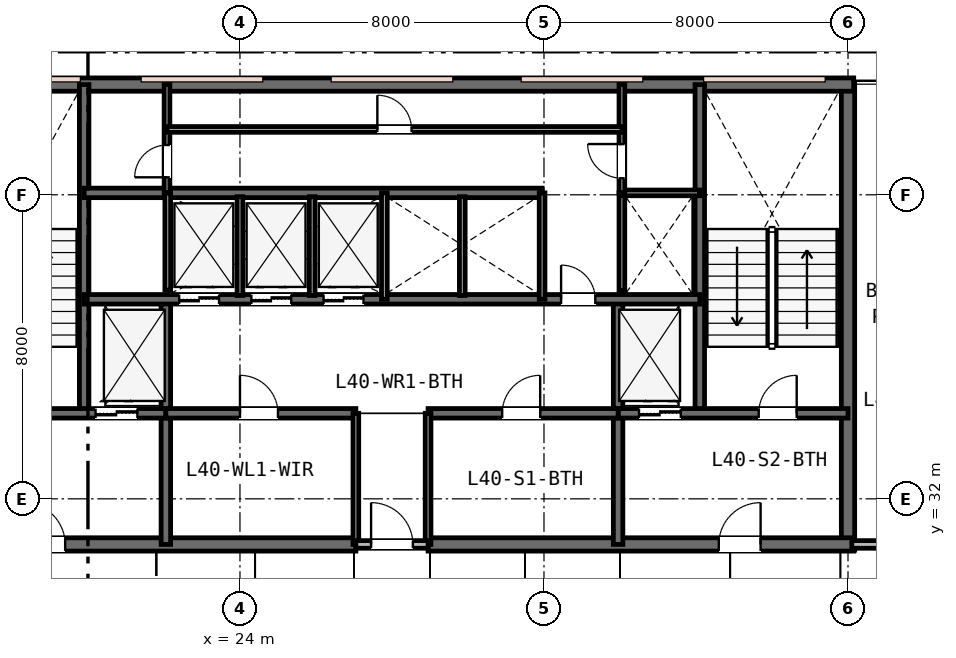
"""IFC4 building model, lengths in metres.
Left out: names, types, materials, properties, quantities, classifications, styles, units other than length and angle.
Written with IfcOpenShell. Run it as: python <this file> out.ifc"""

import sys

from ifc_helpers import new_model, si_unit, direction, frame, frame_2d, origin, place, context, subcontext, project, spatial, rectangle, extrude, element, fill, save


model = new_model("IFC4")
c1 = context("Model", 3, precision=1e-05, world=origin(), true_north=direction((0.0, 1.0)))
c2 = subcontext(c1, "Body", "Model", "MODEL_VIEW")
j1 = project(units=[si_unit("LENGTHUNIT", "METRE"), si_unit("PLANEANGLEUNIT", "RADIAN")], contexts=[c1])
p1 = place(None, origin())
s1 = spatial("IfcSite", under=j1, at=p1, CompositionType="ELEMENT")
p2 = place(p1, origin())
s2 = spatial("IfcBuilding", under=s1, at=p2, CompositionType="ELEMENT")
p3 = place(p2, frame((0.0, 0.0, 157.8)))
s3 = spatial("IfcBuildingStorey", under=s2, at=p3, CompositionType="ELEMENT", Elevation=157.8)
p4 = place(p3, frame((40.0, 30.65, 0.0), z_axis=(0.0, 0.0, 1.0), x_axis=(0.0, 1.0, 0.0)))
e1 = element("IfcWall", 1, at=p4, inside=s3, PredefinedType="SHEAR", context=c2, shape_type="SweptSolid", body=[
    extrude(rectangle(XDim=12.3, YDim=0.35, at=frame_2d((6.15, 0.0))), origin(), (0.0, 0.0, 1.0), 3.6),
])
p5 = place(p3, frame((15.85, 42.9, 0.0), z_axis=(0.0, 0.0, 1.0), x_axis=(1.0, 0.0, 0.0)))
e2 = element("IfcWall", 2, at=p5, inside=s3, PredefinedType="SHEAR", context=c2, shape_type="SweptSolid", body=[
    extrude(rectangle(XDim=24.3, YDim=0.35, at=frame_2d((12.15, 0.0))), origin(), (0.0, 0.0, 1.0), 3.6),
])
p6 = place(p3, frame((15.85, 30.8, 0.0), z_axis=(0.0, 0.0, 1.0), x_axis=(1.0, 0.0, 0.0)))
e3 = element("IfcWall", 3, at=p6, inside=s3, PredefinedType="SHEAR", context=c2, shape_type="SweptSolid", body=[
    extrude(rectangle(XDim=11.2, YDim=0.35, at=frame_2d((5.6, 0.0))), origin(), (0.0, 0.0, 1.0), 3.6),
])
p7 = place(p6, frame((2.45, 0.0, 0.0)))
e4 = element("IfcOpeningElement", 4, at=p7, cuts=e3, PredefinedType="OPENING", context=c2, shape_type="SweptSolid", body=[
    extrude(rectangle(XDim=1.1, YDim=2.15, at=frame_2d((0.55, 1.075))), frame((0.0, 0.185, 0.0), z_axis=(0.0, -1.0, 0.0), x_axis=(1.0, 0.0, 0.0)), (0.0, 0.0, 1.0), 0.37),
])
p8 = place(p3, frame((28.95, 30.8, 0.0), z_axis=(0.0, 0.0, 1.0), x_axis=(1.0, 0.0, 0.0)))
e5 = element("IfcWall", 5, at=p8, inside=s3, PredefinedType="SHEAR", context=c2, shape_type="SweptSolid", body=[
    extrude(rectangle(XDim=11.2, YDim=0.35, at=frame_2d((5.6, 0.0))), origin(), (0.0, 0.0, 1.0), 3.6),
])
p9 = place(p8, frame((7.65, 0.0, 0.0)))
e6 = element("IfcOpeningElement", 6, at=p9, cuts=e5, PredefinedType="OPENING", context=c2, shape_type="SweptSolid", body=[
    extrude(rectangle(XDim=1.1, YDim=2.15, at=frame_2d((0.55, 1.075))), frame((0.0, 0.185, 0.0), z_axis=(0.0, -1.0, 0.0), x_axis=(1.0, 0.0, 0.0)), (0.0, 0.0, 1.0), 0.37),
])
for number, where, z_axis, x_axis in (
    (7, (19.9, 34.25, 0.0), (0.0, 0.0, 1.0), (0.0, 1.0, 0.0)),
    (8, (36.1, 34.25, 0.0), (0.0, 0.0, 1.0), (0.0, 1.0, 0.0)),
):
    element("IfcWall", number, at=place(p3, frame(where, z_axis=z_axis, x_axis=x_axis)), inside=s3, PredefinedType="SHEAR", context=c2, shape_type="SweptSolid", body=[
        extrude(rectangle(XDim=8.65, YDim=0.25, at=frame_2d((4.325, 0.0))), origin(), (0.0, 0.0, 1.0), 3.6),
    ])
for number, where, z_axis, x_axis in (
    (9, (22.05, 30.8, 0.0), (0.0, 0.0, 1.0), (0.0, 1.0, 0.0)),
    (10, (33.95, 30.8, 0.0), (0.0, 0.0, 1.0), (0.0, 1.0, 0.0)),
):
    element("IfcWall", number, at=place(p3, frame(where, z_axis=z_axis, x_axis=x_axis)), inside=s3, PredefinedType="SHEAR", context=c2, shape_type="SweptSolid", body=[
        extrude(rectangle(XDim=6.45, YDim=0.25, at=frame_2d((3.225, 0.0))), origin(), (0.0, 0.0, 1.0), 3.6),
    ])
p10 = place(p3, frame((16.0, 34.25, 0.0), z_axis=(0.0, 0.0, 1.0), x_axis=(1.0, 0.0, 0.0)))
e11 = element("IfcWall", 11, at=p10, inside=s3, PredefinedType="SHEAR", context=c2, shape_type="SweptSolid", body=[
    extrude(rectangle(XDim=6.05, YDim=0.25, at=frame_2d((3.025, 0.0))), origin(), (0.0, 0.0, 1.0), 3.6),
])
p11 = place(p10, frame((1.25, 0.0, 0.0)))
e12 = element("IfcOpeningElement", 12, at=p11, cuts=e11, PredefinedType="OPENING", context=c2, shape_type="SweptSolid", body=[
    extrude(rectangle(XDim=1.0, YDim=2.15, at=frame_2d((0.5, 1.075))), frame((0.0, 0.135, 0.0), z_axis=(0.0, -1.0, 0.0), x_axis=(1.0, 0.0, 0.0)), (0.0, 0.0, 1.0), 0.27),
])
p12 = place(p10, frame((4.2, 0.0, 0.0)))
e13 = element("IfcOpeningElement", 13, at=p12, cuts=e11, PredefinedType="OPENING", context=c2, shape_type="SweptSolid", body=[
    extrude(rectangle(XDim=1.1, YDim=2.15, at=frame_2d((0.55, 1.075))), frame((0.0, 0.135, 0.0), z_axis=(0.0, -1.0, 0.0), x_axis=(1.0, 0.0, 0.0)), (0.0, 0.0, 1.0), 0.27),
])
p13 = place(p3, frame((33.95, 34.25, 0.0), z_axis=(0.0, 0.0, 1.0), x_axis=(1.0, 0.0, 0.0)))
e14 = element("IfcWall", 14, at=p13, inside=s3, PredefinedType="SHEAR", context=c2, shape_type="SweptSolid", body=[
    extrude(rectangle(XDim=6.05, YDim=0.25, at=frame_2d((3.025, 0.0))), origin(), (0.0, 0.0, 1.0), 3.6),
])
p14 = place(p13, frame((3.7, 0.0, 0.0)))
e15 = element("IfcOpeningElement", 15, at=p14, cuts=e14, PredefinedType="OPENING", context=c2, shape_type="SweptSolid", body=[
    extrude(rectangle(XDim=1.0, YDim=2.15, at=frame_2d((0.5, 1.075))), frame((0.0, 0.135, 0.0), z_axis=(0.0, -1.0, 0.0), x_axis=(1.0, 0.0, 0.0)), (0.0, 0.0, 1.0), 0.27),
])
p15 = place(p13, frame((0.55, 0.0, 0.0)))
e16 = element("IfcOpeningElement", 16, at=p15, cuts=e14, PredefinedType="OPENING", context=c2, shape_type="SweptSolid", body=[
    extrude(rectangle(XDim=1.1, YDim=2.15, at=frame_2d((0.55, 1.075))), frame((0.0, 0.135, 0.0), z_axis=(0.0, -1.0, 0.0), x_axis=(1.0, 0.0, 0.0)), (0.0, 0.0, 1.0), 0.27),
])
p16 = place(p3, frame((22.05, 34.25, 0.0), z_axis=(0.0, 0.0, 1.0), x_axis=(1.0, 0.0, 0.0)))
e17 = element("IfcWall", 17, at=p16, inside=s3, PredefinedType="SHEAR", context=c2, shape_type="SweptSolid", body=[
    extrude(rectangle(XDim=5.0, YDim=0.25, at=frame_2d((2.5, 0.0))), origin(), (0.0, 0.0, 1.0), 3.6),
])
p17 = place(p16, frame((1.95, 0.0, 0.0)))
e18 = element("IfcOpeningElement", 18, at=p17, cuts=e17, PredefinedType="OPENING", context=c2, shape_type="SweptSolid", body=[
    extrude(rectangle(XDim=1.0, YDim=2.15, at=frame_2d((0.5, 1.075))), frame((0.0, 0.135, 0.0), z_axis=(0.0, -1.0, 0.0), x_axis=(1.0, 0.0, 0.0)), (0.0, 0.0, 1.0), 0.27),
])
p18 = place(p3, frame((28.95, 34.25, 0.0), z_axis=(0.0, 0.0, 1.0), x_axis=(1.0, 0.0, 0.0)))
e19 = element("IfcWall", 19, at=p18, inside=s3, PredefinedType="SHEAR", context=c2, shape_type="SweptSolid", body=[
    extrude(rectangle(XDim=5.0, YDim=0.25, at=frame_2d((2.5, 0.0))), origin(), (0.0, 0.0, 1.0), 3.6),
])
p19 = place(p18, frame((1.95, 0.0, 0.0)))
e20 = element("IfcOpeningElement", 20, at=p19, cuts=e19, PredefinedType="OPENING", context=c2, shape_type="SweptSolid", body=[
    extrude(rectangle(XDim=1.0, YDim=2.15, at=frame_2d((0.5, 1.075))), frame((0.0, 0.135, 0.0), z_axis=(0.0, -1.0, 0.0), x_axis=(1.0, 0.0, 0.0)), (0.0, 0.0, 1.0), 0.27),
])
p20 = place(p3, frame((19.9, 37.25, 0.0), z_axis=(0.0, 0.0, 1.0), x_axis=(1.0, 0.0, 0.0)))
e21 = element("IfcWall", 21, at=p20, inside=s3, PredefinedType="SHEAR", context=c2, shape_type="SweptSolid", body=[
    extrude(rectangle(XDim=16.2, YDim=0.25, at=frame_2d((8.1, 0.0))), origin(), (0.0, 0.0, 1.0), 3.6),
])
p21 = place(p20, frame((12.55, 0.0, 0.0)))
e22 = element("IfcOpeningElement", 22, at=p21, cuts=e21, PredefinedType="OPENING", context=c2, shape_type="SweptSolid", body=[
    extrude(rectangle(XDim=0.9, YDim=2.15, at=frame_2d((0.45, 1.075))), frame((0.0, 0.135, 0.0), z_axis=(0.0, -1.0, 0.0), x_axis=(1.0, 0.0, 0.0)), (0.0, 0.0, 1.0), 0.27),
])
p22 = place(p20, frame((2.5, 0.0, 0.0)))
e23 = element("IfcOpeningElement", 23, at=p22, cuts=e21, PredefinedType="OPENING", context=c2, shape_type="SweptSolid", body=[
    extrude(rectangle(XDim=1.05, YDim=2.15, at=frame_2d((0.525, 1.075))), frame((0.0, 0.135, 0.0), z_axis=(0.0, -1.0, 0.0), x_axis=(1.0, 0.0, 0.0)), (0.0, 0.0, 1.0), 0.27),
])
p23 = place(p20, frame((4.4, 0.0, 0.0)))
e24 = element("IfcOpeningElement", 24, at=p23, cuts=e21, PredefinedType="OPENING", context=c2, shape_type="SweptSolid", body=[
    extrude(rectangle(XDim=1.05, YDim=2.15, at=frame_2d((0.525, 1.075))), frame((0.0, 0.135, 0.0), z_axis=(0.0, -1.0, 0.0), x_axis=(1.0, 0.0, 0.0)), (0.0, 0.0, 1.0), 0.27),
])
p24 = place(p20, frame((6.3, 0.0, 0.0)))
e25 = element("IfcOpeningElement", 25, at=p24, cuts=e21, PredefinedType="OPENING", context=c2, shape_type="SweptSolid", body=[
    extrude(rectangle(XDim=1.05, YDim=2.15, at=frame_2d((0.525, 1.075))), frame((0.0, 0.135, 0.0), z_axis=(0.0, -1.0, 0.0), x_axis=(1.0, 0.0, 0.0)), (0.0, 0.0, 1.0), 0.27),
])
p25 = place(p3, frame((19.9, 40.05, 0.0), z_axis=(0.0, 0.0, 1.0), x_axis=(1.0, 0.0, 0.0)))
e26 = element("IfcWall", 26, at=p25, inside=s3, PredefinedType="SHEAR", context=c2, shape_type="SweptSolid", body=[
    extrude(rectangle(XDim=12.05, YDim=0.25, at=frame_2d((6.025, 0.0))), origin(), (0.0, 0.0, 1.0), 3.6),
])
for number, where, z_axis, x_axis in (
    (27, (27.05, 30.8, 0.0), (0.0, 0.0, 1.0), (0.0, 1.0, 0.0)),
    (28, (28.95, 30.8, 0.0), (0.0, 0.0, 1.0), (0.0, 1.0, 0.0)),
):
    element("IfcWall", number, at=place(p3, frame(where, z_axis=z_axis, x_axis=x_axis)), inside=s3, PredefinedType="PLUMBINGWALL", context=c2, shape_type="SweptSolid", body=[
        extrude(rectangle(XDim=3.45, YDim=0.15, at=frame_2d((1.725, 0.0))), origin(), (0.0, 0.0, 1.0), 2.96),
    ])
p26 = place(p3, frame((27.05, 30.8, 0.0), z_axis=(0.0, 0.0, 1.0), x_axis=(1.0, 0.0, 0.0)))
e29 = element("IfcWall", 29, at=p26, inside=s3, PredefinedType="PARTITIONING", context=c2, shape_type="SweptSolid", body=[
    extrude(rectangle(XDim=1.9, YDim=0.2, at=frame_2d((0.95, 0.0))), origin(), (0.0, 0.0, 1.0), 2.96),
])
p27 = place(p26, frame((0.4, 0.0, 0.0)))
e30 = element("IfcOpeningElement", 30, at=p27, cuts=e29, PredefinedType="OPENING", context=c2, shape_type="SweptSolid", body=[
    extrude(rectangle(XDim=1.1, YDim=2.15, at=frame_2d((0.55, 1.075))), frame((0.0, 0.11, 0.0), z_axis=(0.0, -1.0, 0.0), x_axis=(1.0, 0.0, 0.0)), (0.0, 0.0, 1.0), 0.22),
])
p28 = place(p3, frame((22.1, 37.49, 0.0), z_axis=(0.0, 0.0, 1.0), x_axis=(0.0, 1.0, 0.0)))
e31 = element("IfcWall", 31, at=p28, inside=s3, PredefinedType="PLUMBINGWALL", context=c2, shape_type="SweptSolid", body=[
    extrude(rectangle(XDim=2.56, YDim=0.15, at=frame_2d((1.28, 0.0))), origin(), (0.0, 0.0, 1.0), 3.33),
])
p29 = place(p3, frame((27.8, 37.25, 0.0), z_axis=(0.0, 0.0, 1.0), x_axis=(0.0, 1.0, 0.0)))
e32 = element("IfcWall", 32, at=p29, inside=s3, PredefinedType="PLUMBINGWALL", context=c2, shape_type="SweptSolid", body=[
    extrude(rectangle(XDim=2.8, YDim=0.15, at=frame_2d((1.4, 0.0))), origin(), (0.0, 0.0, 1.0), 3.33),
])
for number, where, z_axis, x_axis in (
    (33, (24.0, 37.35, 0.0), (0.0, 0.0, 1.0), (0.0, 1.0, 0.0)),
    (34, (25.9, 37.35, 0.0), (0.0, 0.0, 1.0), (0.0, 1.0, 0.0)),
):
    element("IfcWall", number, at=place(p3, frame(where, z_axis=z_axis, x_axis=x_axis)), inside=s3, PredefinedType="PLUMBINGWALL", context=c2, shape_type="SweptSolid", body=[
        extrude(rectangle(XDim=2.6, YDim=0.15, at=frame_2d((1.3, 0.0))), origin(), (0.0, 0.0, 1.0), 3.33),
    ])
p30 = place(p3, frame((31.95, 37.25, 0.0), z_axis=(0.0, 0.0, 1.0), x_axis=(0.0, 1.0, 0.0)))
e35 = element("IfcWall", 35, at=p30, inside=s3, PredefinedType="PLUMBINGWALL", context=c2, shape_type="SweptSolid", body=[
    extrude(rectangle(XDim=2.8, YDim=0.15, at=frame_2d((1.4, 0.0))), origin(), (0.0, 0.0, 1.0), 3.33),
])
p31 = place(p3, frame((29.85, 37.35, 0.0), z_axis=(0.0, 0.0, 1.0), x_axis=(0.0, 1.0, 0.0)))
e36 = element("IfcWall", 36, at=p31, inside=s3, PredefinedType="PLUMBINGWALL", context=c2, shape_type="SweptSolid", body=[
    extrude(rectangle(XDim=2.6, YDim=0.15, at=frame_2d((1.3, 0.0))), origin(), (0.0, 0.0, 1.0), 3.33),
])
p32 = place(p3, frame((34.05, 37.473, 0.0), z_axis=(0.0, 0.0, 1.0), x_axis=(0.0, 1.0, 0.0)))
e37 = element("IfcWall", 37, at=p32, inside=s3, PredefinedType="PLUMBINGWALL", context=c2, shape_type="SweptSolid", body=[
    extrude(rectangle(XDim=2.577, YDim=0.15, at=frame_2d((1.288, 0.0))), origin(), (0.0, 0.0, 1.0), 3.33),
])
p33 = place(p3, frame((34.05, 40.05, 0.0), z_axis=(0.0, 0.0, 1.0), x_axis=(1.0, 0.0, 0.0)))
e38 = element("IfcWall", 38, at=p33, inside=s3, PredefinedType="PARTITIONING", context=c2, shape_type="SweptSolid", body=[
    extrude(rectangle(XDim=2.05, YDim=0.15, at=frame_2d((1.025, 0.0))), origin(), (0.0, 0.0, 1.0), 3.33),
])
p34 = place(p3, frame((34.05, 40.05, 0.0), z_axis=(0.0, 0.0, 1.0), x_axis=(0.0, 1.0, 0.0)))
e39 = element("IfcWall", 39, at=p34, inside=s3, PredefinedType="PARTITIONING", context=c2, shape_type="SweptSolid", body=[
    extrude(rectangle(XDim=2.85, YDim=0.15, at=frame_2d((1.425, 0.0))), origin(), (0.0, 0.0, 1.0), 3.33),
])
p35 = place(p34, frame((0.385, 0.0, 0.0)))
e40 = element("IfcOpeningElement", 40, at=p35, cuts=e39, PredefinedType="OPENING", context=c2, shape_type="SweptSolid", body=[
    extrude(rectangle(XDim=0.9, YDim=2.15, at=frame_2d((0.45, 1.075))), frame((0.0, 0.085, 0.0), z_axis=(0.0, -1.0, 0.0), x_axis=(1.0, 0.0, 0.0)), (0.0, 0.0, 1.0), 0.17),
])
p36 = place(p3, frame((22.08, 40.05, 0.0), z_axis=(0.0, 0.0, 1.0), x_axis=(0.0, 1.0, 0.0)))
e41 = element("IfcWall", 41, at=p36, inside=s3, PredefinedType="PARTITIONING", context=c2, shape_type="SweptSolid", body=[
    extrude(rectangle(XDim=2.85, YDim=0.15, at=frame_2d((1.425, 0.0))), origin(), (0.0, 0.0, 1.0), 3.33),
])
p37 = place(p36, frame((0.41, 0.0, 0.0)))
e42 = element("IfcOpeningElement", 42, at=p37, cuts=e41, PredefinedType="OPENING", context=c2, shape_type="SweptSolid", body=[
    extrude(rectangle(XDim=0.85, YDim=2.15, at=frame_2d((0.425, 1.075))), frame((0.0, 0.085, 0.0), z_axis=(0.0, -1.0, 0.0), x_axis=(1.0, 0.0, 0.0)), (0.0, 0.0, 1.0), 0.17),
])
p38 = place(p3, frame((22.08, 41.72, 0.0), z_axis=(0.0, 0.0, 1.0), x_axis=(1.0, 0.0, 0.0)))
e43 = element("IfcWall", 43, at=p38, inside=s3, PredefinedType="PARTITIONING", context=c2, shape_type="SweptSolid", body=[
    extrude(rectangle(XDim=11.97, YDim=0.15, at=frame_2d((5.985, 0.0))), origin(), (0.0, 0.0, 1.0), 3.33),
])
p39 = place(p38, frame((5.535, 0.0, 0.0)))
e44 = element("IfcOpeningElement", 44, at=p39, cuts=e43, PredefinedType="OPENING", context=c2, shape_type="SweptSolid", body=[
    extrude(rectangle(XDim=0.9, YDim=2.15, at=frame_2d((0.45, 1.075))), frame((0.0, 0.085, 0.0), z_axis=(0.0, -1.0, 0.0), x_axis=(1.0, 0.0, 0.0)), (0.0, 0.0, 1.0), 0.17),
])
p40 = place(p3, frame((40.1, 30.8, 0.0), z_axis=(0.0, 0.0, 1.0), x_axis=(1.0, 0.0, 0.0)))
e45 = element("IfcWall", 45, at=p40, inside=s3, PredefinedType="PARTITIONING", context=c2, shape_type="SweptSolid", body=[
    extrude(rectangle(XDim=4.1, YDim=0.2, at=frame_2d((2.05, 0.0))), origin(), (0.0, 0.0, 1.0), 2.93),
])
p41 = place(p40, frame((1.575, 0.0, 0.0)))
e46 = element("IfcOpeningElement", 46, at=p41, cuts=e45, PredefinedType="OPENING", context=c2, shape_type="SweptSolid", body=[
    extrude(rectangle(XDim=0.95, YDim=2.15, at=frame_2d((0.475, 1.075))), frame((0.0, 0.11, 0.0), z_axis=(0.0, -1.0, 0.0), x_axis=(1.0, 0.0, 0.0)), (0.0, 0.0, 1.0), 0.22),
])
p42 = place(p27, origin())
e47 = element("IfcDoor", 47, at=p42, inside=s3, OperationType="SINGLE_SWING_LEFT", PredefinedType="DOOR", context=c2, shape_type="SweptSolid", body=[
    extrude(rectangle(XDim=1.1, YDim=2.15, at=frame_2d((0.55, 1.075))), frame((0.0, 0.025, 0.0), z_axis=(0.0, -1.0, 0.0), x_axis=(1.0, 0.0, 0.0)), (0.0, 0.0, 1.0), 0.05),
])
fill(e30, e47)
p43 = place(p14, origin())
e48 = element("IfcDoor", 48, at=p43, inside=s3, OperationType="SINGLE_SWING_RIGHT", PredefinedType="DOOR", context=c2, shape_type="SweptSolid", body=[
    extrude(rectangle(XDim=1.0, YDim=2.15, at=frame_2d((0.5, 1.075))), frame((0.0, 0.025, 0.0), z_axis=(0.0, -1.0, 0.0), x_axis=(1.0, 0.0, 0.0)), (0.0, 0.0, 1.0), 0.05),
])
fill(e15, e48)
p44 = place(p7, origin())
e49 = element("IfcDoor", 49, at=p44, inside=s3, OperationType="SINGLE_SWING_LEFT", PredefinedType="DOOR", context=c2, shape_type="SweptSolid", body=[
    extrude(rectangle(XDim=1.1, YDim=2.15, at=frame_2d((0.55, 1.075))), frame((0.0, 0.025, 0.0), z_axis=(0.0, -1.0, 0.0), x_axis=(1.0, 0.0, 0.0)), (0.0, 0.0, 1.0), 0.05),
])
fill(e4, e49)
p45 = place(p9, origin())
e50 = element("IfcDoor", 50, at=p45, inside=s3, OperationType="SINGLE_SWING_RIGHT", PredefinedType="DOOR", context=c2, shape_type="SweptSolid", body=[
    extrude(rectangle(XDim=1.1, YDim=2.15, at=frame_2d((0.55, 1.075))), frame((0.0, 0.025, 0.0), z_axis=(0.0, -1.0, 0.0), x_axis=(1.0, 0.0, 0.0)), (0.0, 0.0, 1.0), 0.05),
])
fill(e6, e50)
p46 = place(p17, origin())
e51 = element("IfcDoor", 51, at=p46, inside=s3, OperationType="SINGLE_SWING_LEFT", PredefinedType="DOOR", context=c2, shape_type="SweptSolid", body=[
    extrude(rectangle(XDim=1.0, YDim=2.15, at=frame_2d((0.5, 1.075))), frame((0.0, 0.025, 0.0), z_axis=(0.0, -1.0, 0.0), x_axis=(1.0, 0.0, 0.0)), (0.0, 0.0, 1.0), 0.05),
])
fill(e18, e51)
p47 = place(p19, origin())
e52 = element("IfcDoor", 52, at=p47, inside=s3, OperationType="SINGLE_SWING_RIGHT", PredefinedType="DOOR", context=c2, shape_type="SweptSolid", body=[
    extrude(rectangle(XDim=1.0, YDim=2.15, at=frame_2d((0.5, 1.075))), frame((0.0, 0.025, 0.0), z_axis=(0.0, -1.0, 0.0), x_axis=(1.0, 0.0, 0.0)), (0.0, 0.0, 1.0), 0.05),
])
fill(e20, e52)
p48 = place(p21, origin())
e53 = element("IfcDoor", 53, at=p48, inside=s3, OperationType="SINGLE_SWING_LEFT", PredefinedType="DOOR", context=c2, shape_type="SweptSolid", body=[
    extrude(rectangle(XDim=0.9, YDim=2.15, at=frame_2d((0.45, 1.075))), frame((0.0, 0.025, 0.0), z_axis=(0.0, -1.0, 0.0), x_axis=(1.0, 0.0, 0.0)), (0.0, 0.0, 1.0), 0.05),
])
fill(e22, e53)
p49 = place(p35, origin())
e54 = element("IfcDoor", 54, at=p49, inside=s3, OperationType="SINGLE_SWING_RIGHT", PredefinedType="DOOR", context=c2, shape_type="SweptSolid", body=[
    extrude(rectangle(XDim=0.9, YDim=2.15, at=frame_2d((0.45, 1.075))), frame((0.0, 0.025, 0.0), z_axis=(0.0, -1.0, 0.0), x_axis=(1.0, 0.0, 0.0)), (0.0, 0.0, 1.0), 0.05),
])
fill(e40, e54)
p50 = place(p37, origin())
e55 = element("IfcDoor", 55, at=p50, inside=s3, OperationType="SINGLE_SWING_LEFT", PredefinedType="DOOR", context=c2, shape_type="SweptSolid", body=[
    extrude(rectangle(XDim=0.85, YDim=2.15, at=frame_2d((0.425, 1.075))), frame((0.0, 0.025, 0.0), z_axis=(0.0, -1.0, 0.0), x_axis=(1.0, 0.0, 0.0)), (0.0, 0.0, 1.0), 0.05),
])
fill(e42, e55)
p51 = place(p39, origin())
e56 = element("IfcDoor", 56, at=p51, inside=s3, OperationType="SINGLE_SWING_LEFT", PredefinedType="DOOR", context=c2, shape_type="SweptSolid", body=[
    extrude(rectangle(XDim=0.9, YDim=2.15, at=frame_2d((0.45, 1.075))), frame((0.0, 0.025, 0.0), z_axis=(0.0, -1.0, 0.0), x_axis=(1.0, 0.0, 0.0)), (0.0, 0.0, 1.0), 0.05),
])
fill(e44, e56)
p52 = place(p12, origin())
e57 = element("IfcDoor", 57, at=p52, inside=s3, OperationType="DOUBLE_DOOR_SLIDING", PredefinedType="DOOR", context=c2, shape_type="SweptSolid", body=[
    extrude(rectangle(XDim=1.1, YDim=2.15, at=frame_2d((0.55, 1.075))), frame((0.0, 0.025, 0.0), z_axis=(0.0, -1.0, 0.0), x_axis=(1.0, 0.0, 0.0)), (0.0, 0.0, 1.0), 0.05),
])
fill(e13, e57)
p53 = place(p15, origin())
e58 = element("IfcDoor", 58, at=p53, inside=s3, OperationType="DOUBLE_DOOR_SLIDING", PredefinedType="DOOR", context=c2, shape_type="SweptSolid", body=[
    extrude(rectangle(XDim=1.1, YDim=2.15, at=frame_2d((0.55, 1.075))), frame((0.0, 0.025, 0.0), z_axis=(0.0, -1.0, 0.0), x_axis=(1.0, 0.0, 0.0)), (0.0, 0.0, 1.0), 0.05),
])
fill(e16, e58)
p54 = place(p22, origin())
e59 = element("IfcDoor", 59, at=p54, inside=s3, OperationType="DOUBLE_DOOR_SLIDING", PredefinedType="DOOR", context=c2, shape_type="SweptSolid", body=[
    extrude(rectangle(XDim=1.05, YDim=2.15, at=frame_2d((0.525, 1.075))), frame((0.0, 0.025, 0.0), z_axis=(0.0, -1.0, 0.0), x_axis=(1.0, 0.0, 0.0)), (0.0, 0.0, 1.0), 0.05),
])
fill(e23, e59)
p55 = place(p23, origin())
e60 = element("IfcDoor", 60, at=p55, inside=s3, OperationType="DOUBLE_DOOR_SLIDING", PredefinedType="DOOR", context=c2, shape_type="SweptSolid", body=[
    extrude(rectangle(XDim=1.05, YDim=2.15, at=frame_2d((0.525, 1.075))), frame((0.0, 0.025, 0.0), z_axis=(0.0, -1.0, 0.0), x_axis=(1.0, 0.0, 0.0)), (0.0, 0.0, 1.0), 0.05),
])
fill(e24, e60)
p56 = place(p24, origin())
e61 = element("IfcDoor", 61, at=p56, inside=s3, OperationType="DOUBLE_DOOR_SLIDING", PredefinedType="DOOR", context=c2, shape_type="SweptSolid", body=[
    extrude(rectangle(XDim=1.05, YDim=2.15, at=frame_2d((0.525, 1.075))), frame((0.0, 0.025, 0.0), z_axis=(0.0, -1.0, 0.0), x_axis=(1.0, 0.0, 0.0)), (0.0, 0.0, 1.0), 0.05),
])
fill(e25, e61)
save(model, sys.argv[1])
